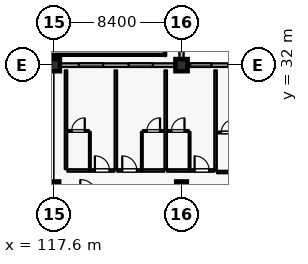
"""IFC4 building model, lengths in metres.
Left out: names, types, materials, properties, quantities, classifications, styles, units other than length and angle.
Written with IfcOpenShell. Run it as: python <this file> out.ifc"""

import sys

from ifc_helpers import new_model, si_unit, direction, frame, frame_2d, origin, origin_2d, place, context, subcontext, project, spatial, rectangle, extrude, element, fill, save


model = new_model("IFC4")
c1 = context("Model", 3, precision=1e-05, world=origin(), true_north=direction((0.0, 1.0)))
c2 = subcontext(c1, "Body", "Model", "MODEL_VIEW")
j1 = project(units=[si_unit("LENGTHUNIT", "METRE"), si_unit("PLANEANGLEUNIT", "RADIAN")], contexts=[c1])
p1 = place(None, origin())
s1 = spatial("IfcSite", under=j1, at=p1, CompositionType="ELEMENT")
p2 = place(p1, origin())
s2 = spatial("IfcBuilding", under=s1, at=p2, CompositionType="ELEMENT")
p3 = place(p2, frame((0.0, 0.0, 16.2)))
s3 = spatial("IfcBuildingStorey", under=s2, at=p3, CompositionType="ELEMENT", Elevation=16.2)
for number, where, z_axis, x_axis in (
    (1, (117.6, 32.0, 0.0), (0.0, 0.0, 1.0), (1.0, 0.0, 0.0)),
    (2, (126.0, 32.0, 0.0), (0.0, 0.0, 1.0), (1.0, 0.0, 0.0)),
):
    element("IfcColumn", number, at=place(p3, frame(where, z_axis=z_axis, x_axis=x_axis)), inside=s3, PredefinedType="COLUMN", context=c2, shape_type="SweptSolid", body=[
        extrude(rectangle(XDim=0.8, YDim=0.8, at=origin_2d()), origin(), (0.0, 0.0, 1.0), 4.8),
    ])
for number, where, z_axis, x_axis in (
    (3, (117.6, 24.0, 0.0), (0.0, 0.0, 1.0), (1.0, 0.0, 0.0)),
    (4, (126.0, 24.0, 0.0), (0.0, 0.0, 1.0), (1.0, 0.0, 0.0)),
):
    element("IfcColumn", number, at=place(p3, frame(where, z_axis=z_axis, x_axis=x_axis)), inside=s3, PredefinedType="COLUMN", context=c2, shape_type="SweptSolid", body=[
        extrude(rectangle(XDim=0.7, YDim=0.7, at=origin_2d()), origin(), (0.0, 0.0, 1.0), 4.8),
    ])
p4 = place(p3, frame((126.0, 39.7, 0.0), z_axis=(0.0, 0.0, 1.0), x_axis=(0.0, -1.0, 0.0)))
e5 = element("IfcWall", 5, at=p4, inside=s3, PredefinedType="SOLIDWALL", context=c2, shape_type="SweptSolid", body=[
    extrude(rectangle(XDim=7.3, YDim=0.28, at=frame_2d((3.65, 0.0))), origin(), (0.0, 0.0, 1.0), 4.5),
])
p5 = place(p4, frame((2.3, 0.0, 1.0)))
e6 = element("IfcOpeningElement", 6, at=p5, cuts=e5, PredefinedType="OPENING", context=c2, shape_type="SweptSolid", body=[
    extrude(rectangle(XDim=2.7, YDim=1.2, at=frame_2d((1.35, 0.6))), frame((0.0, 0.15, 0.0), z_axis=(0.0, -1.0, 0.0), x_axis=(1.0, 0.0, 0.0)), (0.0, 0.0, 1.0), 0.3),
])
p6 = place(p3, frame((118.0, 32.0, 0.0), z_axis=(0.0, 0.0, 1.0), x_axis=(1.0, 0.0, 0.0)))
e7 = element("IfcWall", 7, at=p6, inside=s3, PredefinedType="SOLIDWALL", context=c2, shape_type="SweptSolid", body=[
    extrude(rectangle(XDim=7.6, YDim=0.24, at=frame_2d((3.8, 0.0))), origin(), (0.0, 0.0, 1.0), 4.09),
])
p7 = place(p6, frame((1.24, 0.0, 0.8)))
e8 = element("IfcOpeningElement", 8, at=p7, cuts=e7, PredefinedType="OPENING", context=c2, shape_type="SweptSolid", body=[
    extrude(rectangle(XDim=1.6, YDim=1.6, at=frame_2d((0.8, 0.8))), frame((0.0, 0.13, 0.0), z_axis=(0.0, -1.0, 0.0), x_axis=(1.0, 0.0, 0.0)), (0.0, 0.0, 1.0), 0.26),
])
p8 = place(p6, frame((4.52, 0.0, 0.8)))
e9 = element("IfcOpeningElement", 9, at=p8, cuts=e7, PredefinedType="OPENING", context=c2, shape_type="SweptSolid", body=[
    extrude(rectangle(XDim=1.6, YDim=1.6, at=frame_2d((0.8, 0.8))), frame((0.0, 0.13, 0.0), z_axis=(0.0, -1.0, 0.0), x_axis=(1.0, 0.0, 0.0)), (0.0, 0.0, 1.0), 0.26),
])
p9 = place(p3, frame((126.4, 32.0, 0.0), z_axis=(0.0, 0.0, 1.0), x_axis=(1.0, 0.0, 0.0)))
e10 = element("IfcWall", 10, at=p9, inside=s3, PredefinedType="SOLIDWALL", context=c2, shape_type="SweptSolid", body=[
    extrude(rectangle(XDim=7.6, YDim=0.24, at=frame_2d((3.8, 0.0))), origin(), (0.0, 0.0, 1.0), 4.09),
])
p10 = place(p9, frame((0.17, 0.0, 0.8)))
e11 = element("IfcOpeningElement", 11, at=p10, cuts=e10, PredefinedType="OPENING", context=c2, shape_type="SweptSolid", body=[
    extrude(rectangle(XDim=1.4, YDim=1.6, at=frame_2d((0.7, 0.8))), frame((0.0, 0.13, 0.0), z_axis=(0.0, -1.0, 0.0), x_axis=(1.0, 0.0, 0.0)), (0.0, 0.0, 1.0), 0.26),
])
p11 = place(p9, frame((2.68, 0.0, 0.8)))
e12 = element("IfcOpeningElement", 12, at=p11, cuts=e10, PredefinedType="OPENING", context=c2, shape_type="SweptSolid", body=[
    extrude(rectangle(XDim=1.6, YDim=1.6, at=frame_2d((0.8, 0.8))), frame((0.0, 0.13, 0.0), z_axis=(0.0, -1.0, 0.0), x_axis=(1.0, 0.0, 0.0)), (0.0, 0.0, 1.0), 0.26),
])
p12 = place(p9, frame((5.61, 0.0, 0.8)))
e13 = element("IfcOpeningElement", 13, at=p12, cuts=e10, PredefinedType="OPENING", context=c2, shape_type="SweptSolid", body=[
    extrude(rectangle(XDim=1.6, YDim=1.6, at=frame_2d((0.8, 0.8))), frame((0.0, 0.13, 0.0), z_axis=(0.0, -1.0, 0.0), x_axis=(1.0, 0.0, 0.0)), (0.0, 0.0, 1.0), 0.26),
])
p13 = place(p3, frame((118.49, 25.07, 0.0), z_axis=(0.0, 0.0, 1.0), x_axis=(1.0, 0.0, 0.0)))
e14 = element("IfcWall", 14, at=p13, inside=s3, PredefinedType="PARTITIONING", context=c2, shape_type="SweptSolid", body=[
    extrude(rectangle(XDim=1.47, YDim=0.16, at=frame_2d((0.735, 0.0))), origin(), (0.0, 0.0, 1.0), 4.535),
])
p14 = place(p3, frame((119.97, 25.07, 0.0), z_axis=(0.0, 0.0, 1.0), x_axis=(1.0, 0.0, 0.0)))
e15 = element("IfcWall", 15, at=p14, inside=s3, PredefinedType="PARTITIONING", context=c2, shape_type="SweptSolid", body=[
    extrude(rectangle(XDim=1.62, YDim=0.16, at=frame_2d((0.81, 0.0))), origin(), (0.0, 0.0, 1.0), 4.535),
])
p15 = place(p14, frame((0.33, 0.0, 0.0)))
e16 = element("IfcOpeningElement", 16, at=p15, cuts=e15, PredefinedType="OPENING", context=c2, shape_type="SweptSolid", body=[
    extrude(rectangle(XDim=0.96, YDim=2.2, at=frame_2d((0.48, 1.1))), frame((0.0, 0.09, 0.0), z_axis=(0.0, -1.0, 0.0), x_axis=(1.0, 0.0, 0.0)), (0.0, 0.0, 1.0), 0.18),
])
p16 = place(p3, frame((119.97, 25.16, 0.0), z_axis=(0.0, 0.0, 1.0), x_axis=(0.0, 1.0, 0.0)))
e17 = element("IfcWall", 17, at=p16, inside=s3, PredefinedType="PARTITIONING", context=c2, shape_type="SweptSolid", body=[
    extrude(rectangle(XDim=2.45, YDim=0.115, at=frame_2d((1.225, 0.0))), origin(), (0.0, 0.0, 1.0), 4.535),
])
p17 = place(p3, frame((118.5, 27.67, 0.0), z_axis=(0.0, 0.0, 1.0), x_axis=(1.0, 0.0, 0.0)))
e18 = element("IfcWall", 18, at=p17, inside=s3, PredefinedType="PARTITIONING", context=c2, shape_type="SweptSolid", body=[
    extrude(rectangle(XDim=1.41, YDim=0.115, at=frame_2d((0.705, 0.0))), origin(), (0.0, 0.0, 1.0), 4.535),
])
p18 = place(p17, frame((0.275, 0.0, 0.0)))
e19 = element("IfcOpeningElement", 19, at=p18, cuts=e18, PredefinedType="OPENING", context=c2, shape_type="SweptSolid", body=[
    extrude(rectangle(XDim=0.86, YDim=2.12, at=frame_2d((0.43, 1.06))), frame((0.0, 0.067, 0.0), z_axis=(0.0, -1.0, 0.0), x_axis=(1.0, 0.0, 0.0)), (0.0, 0.0, 1.0), 0.135),
])
p19 = place(p3, frame((118.4, 25.16, 0.0), z_axis=(0.0, 0.0, 1.0), x_axis=(0.0, 1.0, 0.0)))
e20 = element("IfcWall", 20, at=p19, inside=s3, PredefinedType="PARTITIONING", context=c2, shape_type="SweptSolid", body=[
    extrude(rectangle(XDim=6.5, YDim=0.16, at=frame_2d((3.25, 0.0))), origin(), (0.0, 0.0, 1.0), 4.535),
])
p20 = place(p3, frame((121.77, 25.07, 0.0), z_axis=(0.0, 0.0, 1.0), x_axis=(1.0, 0.0, 0.0)))
e21 = element("IfcWall", 21, at=p20, inside=s3, PredefinedType="PARTITIONING", context=c2, shape_type="SweptSolid", body=[
    extrude(rectangle(XDim=1.62, YDim=0.16, at=frame_2d((0.81, 0.0))), origin(), (0.0, 0.0, 1.0), 4.535),
])
p21 = place(p20, frame((0.33, 0.0, 0.0)))
e22 = element("IfcOpeningElement", 22, at=p21, cuts=e21, PredefinedType="OPENING", context=c2, shape_type="SweptSolid", body=[
    extrude(rectangle(XDim=0.96, YDim=2.2, at=frame_2d((0.48, 1.1))), frame((0.0, 0.09, 0.0), z_axis=(0.0, -1.0, 0.0), x_axis=(1.0, 0.0, 0.0)), (0.0, 0.0, 1.0), 0.18),
])
p22 = place(p3, frame((123.4, 25.07, 0.0), z_axis=(0.0, 0.0, 1.0), x_axis=(1.0, 0.0, 0.0)))
e23 = element("IfcWall", 23, at=p22, inside=s3, PredefinedType="PARTITIONING", context=c2, shape_type="SweptSolid", body=[
    extrude(rectangle(XDim=1.47, YDim=0.16, at=frame_2d((0.735, 0.0))), origin(), (0.0, 0.0, 1.0), 4.535),
])
p23 = place(p3, frame((123.39, 25.16, 0.0), z_axis=(0.0, 0.0, 1.0), x_axis=(0.0, 1.0, 0.0)))
e24 = element("IfcWall", 24, at=p23, inside=s3, PredefinedType="PARTITIONING", context=c2, shape_type="SweptSolid", body=[
    extrude(rectangle(XDim=2.45, YDim=0.115, at=frame_2d((1.225, 0.0))), origin(), (0.0, 0.0, 1.0), 4.535),
])
p24 = place(p3, frame((123.45, 27.67, 0.0), z_axis=(0.0, 0.0, 1.0), x_axis=(1.0, 0.0, 0.0)))
e25 = element("IfcWall", 25, at=p24, inside=s3, PredefinedType="PARTITIONING", context=c2, shape_type="SweptSolid", body=[
    extrude(rectangle(XDim=1.41, YDim=0.115, at=frame_2d((0.705, 0.0))), origin(), (0.0, 0.0, 1.0), 4.535),
])
p25 = place(p24, frame((0.275, 0.0, 0.0)))
e26 = element("IfcOpeningElement", 26, at=p25, cuts=e25, PredefinedType="OPENING", context=c2, shape_type="SweptSolid", body=[
    extrude(rectangle(XDim=0.86, YDim=2.12, at=frame_2d((0.43, 1.06))), frame((0.0, 0.067, 0.0), z_axis=(0.0, -1.0, 0.0), x_axis=(1.0, 0.0, 0.0)), (0.0, 0.0, 1.0), 0.135),
])
p26 = place(p3, frame((121.68, 25.16, 0.0), z_axis=(0.0, 0.0, 1.0), x_axis=(0.0, 1.0, 0.0)))
e27 = element("IfcWall", 27, at=p26, inside=s3, PredefinedType="PARTITIONING", context=c2, shape_type="SweptSolid", body=[
    extrude(rectangle(XDim=6.5, YDim=0.16, at=frame_2d((3.25, 0.0))), origin(), (0.0, 0.0, 1.0), 4.535),
])
p27 = place(p3, frame((125.05, 25.07, 0.0), z_axis=(0.0, 0.0, 1.0), x_axis=(1.0, 0.0, 0.0)))
e28 = element("IfcWall", 28, at=p27, inside=s3, PredefinedType="PARTITIONING", context=c2, shape_type="SweptSolid", body=[
    extrude(rectangle(XDim=1.47, YDim=0.16, at=frame_2d((0.735, 0.0))), origin(), (0.0, 0.0, 1.0), 4.535),
])
p28 = place(p3, frame((126.53, 25.07, 0.0), z_axis=(0.0, 0.0, 1.0), x_axis=(1.0, 0.0, 0.0)))
e29 = element("IfcWall", 29, at=p28, inside=s3, PredefinedType="PARTITIONING", context=c2, shape_type="SweptSolid", body=[
    extrude(rectangle(XDim=1.62, YDim=0.16, at=frame_2d((0.81, 0.0))), origin(), (0.0, 0.0, 1.0), 4.535),
])
p29 = place(p28, frame((0.33, 0.0, 0.0)))
e30 = element("IfcOpeningElement", 30, at=p29, cuts=e29, PredefinedType="OPENING", context=c2, shape_type="SweptSolid", body=[
    extrude(rectangle(XDim=0.96, YDim=2.2, at=frame_2d((0.48, 1.1))), frame((0.0, 0.09, 0.0), z_axis=(0.0, -1.0, 0.0), x_axis=(1.0, 0.0, 0.0)), (0.0, 0.0, 1.0), 0.18),
])
p30 = place(p3, frame((126.53, 25.16, 0.0), z_axis=(0.0, 0.0, 1.0), x_axis=(0.0, 1.0, 0.0)))
e31 = element("IfcWall", 31, at=p30, inside=s3, PredefinedType="PARTITIONING", context=c2, shape_type="SweptSolid", body=[
    extrude(rectangle(XDim=2.45, YDim=0.115, at=frame_2d((1.225, 0.0))), origin(), (0.0, 0.0, 1.0), 4.535),
])
p31 = place(p3, frame((125.06, 27.67, 0.0), z_axis=(0.0, 0.0, 1.0), x_axis=(1.0, 0.0, 0.0)))
e32 = element("IfcWall", 32, at=p31, inside=s3, PredefinedType="PARTITIONING", context=c2, shape_type="SweptSolid", body=[
    extrude(rectangle(XDim=1.41, YDim=0.115, at=frame_2d((0.705, 0.0))), origin(), (0.0, 0.0, 1.0), 4.535),
])
p32 = place(p31, frame((0.275, 0.0, 0.0)))
e33 = element("IfcOpeningElement", 33, at=p32, cuts=e32, PredefinedType="OPENING", context=c2, shape_type="SweptSolid", body=[
    extrude(rectangle(XDim=0.86, YDim=2.12, at=frame_2d((0.43, 1.06))), frame((0.0, 0.067, 0.0), z_axis=(0.0, -1.0, 0.0), x_axis=(1.0, 0.0, 0.0)), (0.0, 0.0, 1.0), 0.135),
])
p33 = place(p3, frame((124.96, 25.16, 0.0), z_axis=(0.0, 0.0, 1.0), x_axis=(0.0, 1.0, 0.0)))
e34 = element("IfcWall", 34, at=p33, inside=s3, PredefinedType="PARTITIONING", context=c2, shape_type="SweptSolid", body=[
    extrude(rectangle(XDim=6.5, YDim=0.16, at=frame_2d((3.25, 0.0))), origin(), (0.0, 0.0, 1.0), 4.535),
])
p34 = place(p3, frame((128.33, 24.97, 0.0), z_axis=(0.0, 0.0, 1.0), x_axis=(1.0, 0.0, 0.0)))
e35 = element("IfcWall", 35, at=p34, inside=s3, PredefinedType="PARTITIONING", context=c2, shape_type="SweptSolid", body=[
    extrude(rectangle(XDim=1.47, YDim=0.16, at=frame_2d((0.735, 0.0))), origin(), (0.0, 0.0, 1.0), 4.535),
])
p35 = place(p3, frame((128.34, 27.57, 0.0), z_axis=(0.0, 0.0, 1.0), x_axis=(1.0, 0.0, 0.0)))
e36 = element("IfcWall", 36, at=p35, inside=s3, PredefinedType="PARTITIONING", context=c2, shape_type="SweptSolid", body=[
    extrude(rectangle(XDim=1.41, YDim=0.115, at=frame_2d((0.705, 0.0))), origin(), (0.0, 0.0, 1.0), 4.535),
])
p36 = place(p35, frame((0.275, 0.0, 0.0)))
e37 = element("IfcOpeningElement", 37, at=p36, cuts=e36, PredefinedType="OPENING", context=c2, shape_type="SweptSolid", body=[
    extrude(rectangle(XDim=0.86, YDim=2.12, at=frame_2d((0.43, 1.06))), frame((0.0, 0.067, 0.0), z_axis=(0.0, -1.0, 0.0), x_axis=(1.0, 0.0, 0.0)), (0.0, 0.0, 1.0), 0.135),
])
p37 = place(p3, frame((128.24, 25.06, 0.0), z_axis=(0.0, 0.0, 1.0), x_axis=(0.0, 1.0, 0.0)))
e38 = element("IfcWall", 38, at=p37, inside=s3, PredefinedType="PARTITIONING", context=c2, shape_type="SweptSolid", body=[
    extrude(rectangle(XDim=6.6, YDim=0.16, at=frame_2d((3.3, 0.0))), origin(), (0.0, 0.0, 1.0), 4.535),
])
p38 = place(p3, frame((112.34, 32.68, 0.0), z_axis=(0.0, 0.0, 1.0), x_axis=(1.0, 0.0, 0.0)))
e39 = element("IfcWall", 39, at=p38, inside=s3, PredefinedType="PARTITIONING", context=c2, shape_type="SweptSolid", body=[
    extrude(rectangle(XDim=12.41, YDim=0.14, at=frame_2d((6.205, 0.0))), origin(), (0.0, 0.0, 1.0), 4.535),
])
p39 = place(p38, frame((2.6, 0.0, 0.0)))
e40 = element("IfcOpeningElement", 40, at=p39, cuts=e39, PredefinedType="OPENING", context=c2, shape_type="SweptSolid", body=[
    extrude(rectangle(XDim=1.9, YDim=2.4, at=frame_2d((0.95, 1.2))), frame((0.0, 0.08, 0.0), z_axis=(0.0, -1.0, 0.0), x_axis=(1.0, 0.0, 0.0)), (0.0, 0.0, 1.0), 0.16),
])
p40 = place(p3, frame((124.92, 32.6, 0.0), z_axis=(0.0, 0.0, 1.0), x_axis=(0.0, 1.0, 0.0)))
e41 = element("IfcWall", 41, at=p40, inside=s3, PredefinedType="PARTITIONING", context=c2, shape_type="SweptSolid", body=[
    extrude(rectangle(XDim=11.6, YDim=0.14, at=frame_2d((5.8, 0.0))), origin(), (0.0, 0.0, 1.0), 4.535),
])
p41 = place(p7, origin())
e42 = element("IfcWindow", 42, at=p41, inside=s3, PartitioningType="SINGLE_PANEL", PredefinedType="WINDOW", context=c2, shape_type="SweptSolid", body=[
    extrude(rectangle(XDim=1.6, YDim=1.6, at=frame_2d((0.8, 0.8))), frame((0.0, 0.03, 0.0), z_axis=(0.0, -1.0, 0.0), x_axis=(1.0, 0.0, 0.0)), (0.0, 0.0, 1.0), 0.06),
])
fill(e8, e42)
p42 = place(p8, origin())
e43 = element("IfcWindow", 43, at=p42, inside=s3, PartitioningType="SINGLE_PANEL", PredefinedType="WINDOW", context=c2, shape_type="SweptSolid", body=[
    extrude(rectangle(XDim=1.6, YDim=1.6, at=frame_2d((0.8, 0.8))), frame((0.0, 0.03, 0.0), z_axis=(0.0, -1.0, 0.0), x_axis=(1.0, 0.0, 0.0)), (0.0, 0.0, 1.0), 0.06),
])
fill(e9, e43)
p43 = place(p10, origin())
e44 = element("IfcWindow", 44, at=p43, inside=s3, PartitioningType="SINGLE_PANEL", PredefinedType="WINDOW", context=c2, shape_type="SweptSolid", body=[
    extrude(rectangle(XDim=1.4, YDim=1.6, at=frame_2d((0.7, 0.8))), frame((0.0, 0.03, 0.0), z_axis=(0.0, -1.0, 0.0), x_axis=(1.0, 0.0, 0.0)), (0.0, 0.0, 1.0), 0.06),
])
fill(e11, e44)
p44 = place(p11, origin())
e45 = element("IfcWindow", 45, at=p44, inside=s3, PartitioningType="SINGLE_PANEL", PredefinedType="WINDOW", context=c2, shape_type="SweptSolid", body=[
    extrude(rectangle(XDim=1.6, YDim=1.6, at=frame_2d((0.8, 0.8))), frame((0.0, 0.03, 0.0), z_axis=(0.0, -1.0, 0.0), x_axis=(1.0, 0.0, 0.0)), (0.0, 0.0, 1.0), 0.06),
])
fill(e12, e45)
p45 = place(p15, origin())
e46 = element("IfcDoor", 46, at=p45, inside=s3, OperationType="SINGLE_SWING_LEFT", PredefinedType="DOOR", context=c2, shape_type="SweptSolid", body=[
    extrude(rectangle(XDim=0.96, YDim=2.2, at=frame_2d((0.48, 1.1))), frame((0.0, 0.025, 0.0), z_axis=(0.0, -1.0, 0.0), x_axis=(1.0, 0.0, 0.0)), (0.0, 0.0, 1.0), 0.05),
])
fill(e16, e46)
p46 = place(p18, origin())
e47 = element("IfcDoor", 47, at=p46, inside=s3, OperationType="SINGLE_SWING_RIGHT", PredefinedType="DOOR", context=c2, shape_type="SweptSolid", body=[
    extrude(rectangle(XDim=0.86, YDim=2.12, at=frame_2d((0.43, 1.06))), frame((0.0, 0.025, 0.0), z_axis=(0.0, -1.0, 0.0), x_axis=(1.0, 0.0, 0.0)), (0.0, 0.0, 1.0), 0.05),
])
fill(e19, e47)
p47 = place(p21, origin())
e48 = element("IfcDoor", 48, at=p47, inside=s3, OperationType="SINGLE_SWING_LEFT", PredefinedType="DOOR", context=c2, shape_type="SweptSolid", body=[
    extrude(rectangle(XDim=0.96, YDim=2.2, at=frame_2d((0.48, 1.1))), frame((0.0, 0.025, 0.0), z_axis=(0.0, -1.0, 0.0), x_axis=(1.0, 0.0, 0.0)), (0.0, 0.0, 1.0), 0.05),
])
fill(e22, e48)
p48 = place(p25, origin())
e49 = element("IfcDoor", 49, at=p48, inside=s3, OperationType="SINGLE_SWING_RIGHT", PredefinedType="DOOR", context=c2, shape_type="SweptSolid", body=[
    extrude(rectangle(XDim=0.86, YDim=2.12, at=frame_2d((0.43, 1.06))), frame((0.0, 0.025, 0.0), z_axis=(0.0, -1.0, 0.0), x_axis=(1.0, 0.0, 0.0)), (0.0, 0.0, 1.0), 0.05),
])
fill(e26, e49)
p49 = place(p29, origin())
e50 = element("IfcDoor", 50, at=p49, inside=s3, OperationType="SINGLE_SWING_LEFT", PredefinedType="DOOR", context=c2, shape_type="SweptSolid", body=[
    extrude(rectangle(XDim=0.96, YDim=2.2, at=frame_2d((0.48, 1.1))), frame((0.0, 0.025, 0.0), z_axis=(0.0, -1.0, 0.0), x_axis=(1.0, 0.0, 0.0)), (0.0, 0.0, 1.0), 0.05),
])
fill(e30, e50)
p50 = place(p32, origin())
e51 = element("IfcDoor", 51, at=p50, inside=s3, OperationType="SINGLE_SWING_RIGHT", PredefinedType="DOOR", context=c2, shape_type="SweptSolid", body=[
    extrude(rectangle(XDim=0.86, YDim=2.12, at=frame_2d((0.43, 1.06))), frame((0.0, 0.025, 0.0), z_axis=(0.0, -1.0, 0.0), x_axis=(1.0, 0.0, 0.0)), (0.0, 0.0, 1.0), 0.05),
])
fill(e33, e51)
p51 = place(p36, origin())
e52 = element("IfcDoor", 52, at=p51, inside=s3, OperationType="SINGLE_SWING_RIGHT", PredefinedType="DOOR", context=c2, shape_type="SweptSolid", body=[
    extrude(rectangle(XDim=0.86, YDim=2.12, at=frame_2d((0.43, 1.06))), frame((0.0, 0.025, 0.0), z_axis=(0.0, -1.0, 0.0), x_axis=(1.0, 0.0, 0.0)), (0.0, 0.0, 1.0), 0.05),
])
fill(e37, e52)
save(model, sys.argv[1])
